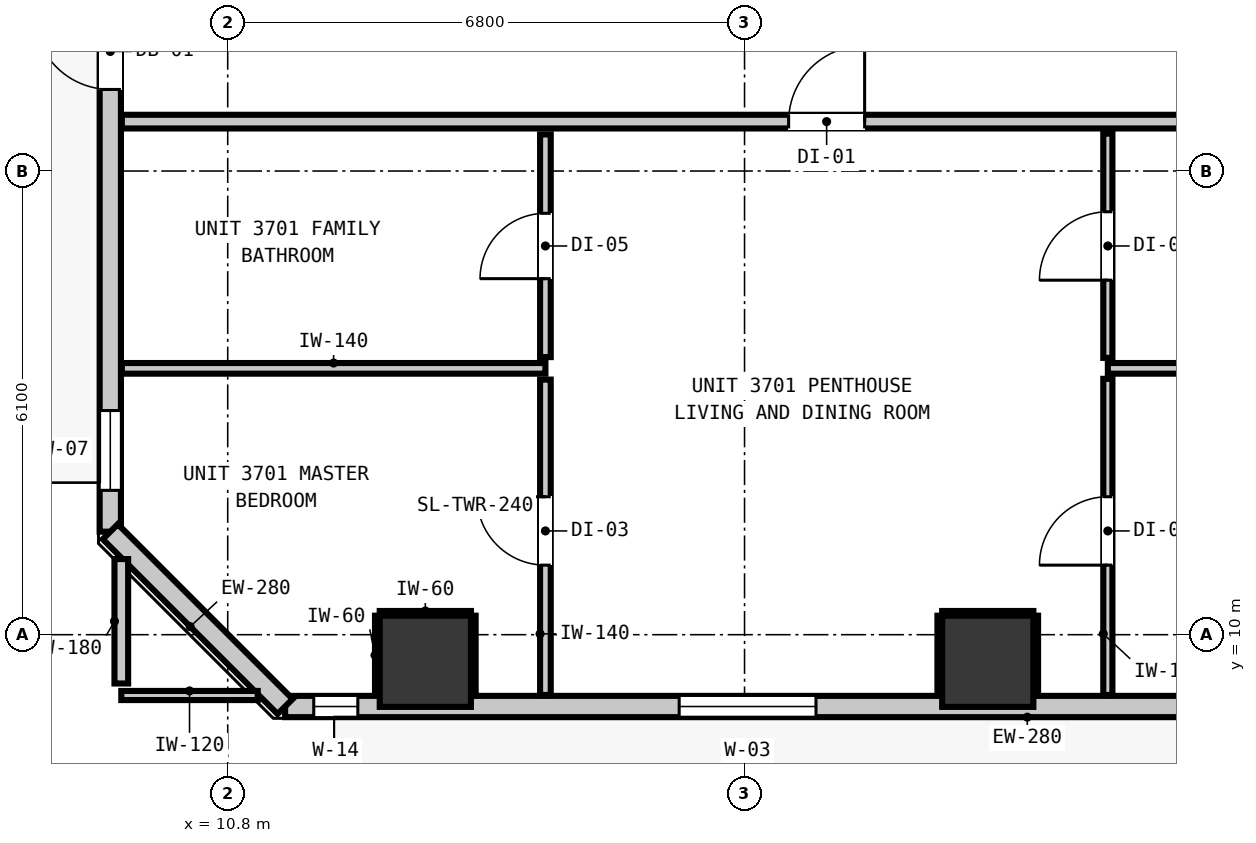
"""IFC4 building model, lengths in metres.
Left out: names, types, materials, properties, quantities, classifications, styles, units other than length and angle.
Written with IfcOpenShell. Run it as: python <this file> out.ifc"""

import sys

from ifc_helpers import new_model, si_unit, direction, frame, frame_2d, origin, origin_2d, place, context, subcontext, project, spatial, rectangle, extrude, element, fill, save


model = new_model("IFC4")
c1 = context("Model", 3, precision=1e-05, world=origin(), true_north=direction((0.0, 1.0)))
c2 = subcontext(c1, "Body", "Model", "MODEL_VIEW")
j1 = project(units=[si_unit("LENGTHUNIT", "METRE"), si_unit("PLANEANGLEUNIT", "RADIAN")], contexts=[c1])
p1 = place(None, origin())
s1 = spatial("IfcSite", under=j1, at=p1, CompositionType="ELEMENT")
p2 = place(p1, origin())
s2 = spatial("IfcBuilding", under=s1, at=p2, CompositionType="ELEMENT")
p3 = place(p2, frame((0.0, 0.0, 129.32)))
s3 = spatial("IfcBuildingStorey", under=s2, at=p3, CompositionType="ELEMENT", Elevation=129.32)
for number, where, z_axis, x_axis in (
    (1, (13.4, 9.65, 0.0), (0.0, 0.0, 1.0), (1.0, 0.0, 0.0)),
    (2, (20.8, 9.65, 0.0), (0.0, 0.0, 1.0), (1.0, 0.0, 0.0)),
):
    element("IfcColumn", number, at=place(p3, frame(where, z_axis=z_axis, x_axis=x_axis)), inside=s3, PredefinedType="COLUMN", context=c2, shape_type="SweptSolid", body=[
        extrude(rectangle(XDim=1.2, YDim=1.2, at=origin_2d()), origin(), (0.0, 0.0, 1.0), 3.32),
    ])
p4 = place(p3, frame((9.255, 11.355, 0.0), z_axis=(0.0, 0.0, 1.0), x_axis=(0.0, 1.0, 0.0)))
e3 = element("IfcWall", 3, at=p4, inside=s3, PredefinedType="STANDARD", context=c2, shape_type="SweptSolid", body=[
    extrude(rectangle(XDim=32.29, YDim=0.28, at=frame_2d((16.145, 0.0))), origin(), (0.0, 0.0, 1.0), 3.08),
])
p5 = place(p4, frame((5.818, 0.0, 0.0)))
e4 = element("IfcOpeningElement", 4, at=p5, cuts=e3, PredefinedType="OPENING", context=c2, shape_type="SweptSolid", body=[
    extrude(rectangle(XDim=1.0, YDim=2.15, at=frame_2d((0.5, 1.075))), frame((0.0, 0.15, 0.0), z_axis=(0.0, -1.0, 0.0), x_axis=(1.0, 0.0, 0.0)), (0.0, 0.0, 1.0), 0.3),
])
p6 = place(p4, frame((0.544, 0.0, 0.85)))
e5 = element("IfcOpeningElement", 5, at=p6, cuts=e3, PredefinedType="OPENING", context=c2, shape_type="SweptSolid", body=[
    extrude(rectangle(XDim=1.05, YDim=1.65, at=frame_2d((0.525, 0.825))), frame((0.0, 0.15, 0.0), z_axis=(0.0, -1.0, 0.0), x_axis=(1.0, 0.0, 0.0)), (0.0, 0.0, 1.0), 0.3),
])
p7 = place(p3, frame((46.645, 9.055, 0.0), z_axis=(0.0, 0.0, 1.0), x_axis=(-1.0, 0.0, 0.0)))
e6 = element("IfcWall", 6, at=p7, inside=s3, PredefinedType="STANDARD", context=c2, shape_type="SweptSolid", body=[
    extrude(rectangle(XDim=35.09, YDim=0.28, at=frame_2d((17.545, 0.0))), origin(), (0.0, 0.0, 1.0), 3.08),
])
p8 = place(p7, frame((0.904, 0.0, 0.0)))
e7 = element("IfcOpeningElement", 7, at=p8, cuts=e6, PredefinedType="OPENING", context=c2, shape_type="SweptSolid", body=[
    extrude(rectangle(XDim=1.0, YDim=2.15, at=frame_2d((0.5, 1.075))), frame((0.0, 0.15, 0.0), z_axis=(0.0, -1.0, 0.0), x_axis=(1.0, 0.0, 0.0)), (0.0, 0.0, 1.0), 0.3),
])
p9 = place(p7, frame((28.105, 0.0, 0.85)))
e8 = element("IfcOpeningElement", 8, at=p9, cuts=e6, PredefinedType="OPENING", context=c2, shape_type="SweptSolid", body=[
    extrude(rectangle(XDim=1.8, YDim=1.9, at=frame_2d((0.9, 0.95))), frame((0.0, 0.15, 0.0), z_axis=(0.0, -1.0, 0.0), x_axis=(1.0, 0.0, 0.0)), (0.0, 0.0, 1.0), 0.3),
])
p10 = place(p7, frame((34.133, 0.0, 0.85)))
e9 = element("IfcOpeningElement", 9, at=p10, cuts=e6, PredefinedType="OPENING", context=c2, shape_type="SweptSolid", body=[
    extrude(rectangle(XDim=0.58, YDim=1.5, at=frame_2d((0.29, 0.75))), frame((0.0, 0.15, 0.0), z_axis=(0.0, -1.0, 0.0), x_axis=(1.0, 0.0, 0.0)), (0.0, 0.0, 1.0), 0.3),
])
p11 = place(p7, frame((20.745, 0.0, 0.85)))
e10 = element("IfcOpeningElement", 10, at=p11, cuts=e6, PredefinedType="OPENING", context=c2, shape_type="SweptSolid", body=[
    extrude(rectangle(XDim=1.8, YDim=1.9, at=frame_2d((0.9, 0.95))), frame((0.0, 0.15, 0.0), z_axis=(0.0, -1.0, 0.0), x_axis=(1.0, 0.0, 0.0)), (0.0, 0.0, 1.0), 0.3),
])
p12 = place(p7, frame((14.873, 0.0, 0.85)))
e11 = element("IfcOpeningElement", 11, at=p12, cuts=e6, PredefinedType="OPENING", context=c2, shape_type="SweptSolid", body=[
    extrude(rectangle(XDim=1.8, YDim=1.9, at=frame_2d((0.9, 0.95))), frame((0.0, 0.15, 0.0), z_axis=(0.0, -1.0, 0.0), x_axis=(1.0, 0.0, 0.0)), (0.0, 0.0, 1.0), 0.3),
])
p13 = place(p7, frame((4.902, 0.0, 0.85)))
e12 = element("IfcOpeningElement", 12, at=p13, cuts=e6, PredefinedType="OPENING", context=c2, shape_type="SweptSolid", body=[
    extrude(rectangle(XDim=1.8, YDim=1.9, at=frame_2d((0.9, 0.95))), frame((0.0, 0.15, 0.0), z_axis=(0.0, -1.0, 0.0), x_axis=(1.0, 0.0, 0.0)), (0.0, 0.0, 1.0), 0.3),
])
p14 = place(p7, frame((11.723, 0.0, 0.85)))
e13 = element("IfcOpeningElement", 13, at=p14, cuts=e6, PredefinedType="OPENING", context=c2, shape_type="SweptSolid", body=[
    extrude(rectangle(XDim=1.8, YDim=1.9, at=frame_2d((0.9, 0.95))), frame((0.0, 0.15, 0.0), z_axis=(0.0, -1.0, 0.0), x_axis=(1.0, 0.0, 0.0)), (0.0, 0.0, 1.0), 0.3),
])
p15 = place(p3, frame((11.555, 9.055, 0.0), z_axis=(0.0, 0.0, 1.0), x_axis=(-0.707106781187, 0.707106781187, 0.0)))
e14 = element("IfcWall", 14, at=p15, inside=s3, PredefinedType="STANDARD", context=c2, shape_type="SweptSolid", body=[
    extrude(rectangle(XDim=3.253, YDim=0.28, at=frame_2d((1.626, 0.0))), origin(), (0.0, 0.0, 1.0), 3.08),
])
p16 = place(p3, frame((9.407, 16.75, 0.0), z_axis=(0.0, 0.0, 1.0), x_axis=(1.0, 0.0, 0.0)))
e15 = element("IfcWall", 15, at=p16, inside=s3, PredefinedType="PARTITIONING", context=c2, shape_type="SweptSolid", body=[
    extrude(rectangle(XDim=39.386, YDim=0.18, at=frame_2d((19.693, 0.0))), origin(), (0.0, 0.0, 1.0), 3.08),
])
p17 = place(p16, frame((8.773, 0.0, 0.0)))
e16 = element("IfcOpeningElement", 16, at=p17, cuts=e15, PredefinedType="OPENING", context=c2, shape_type="SweptSolid", body=[
    extrude(rectangle(XDim=1.0, YDim=2.15, at=frame_2d((0.5, 1.075))), frame((0.0, 0.1, 0.0), z_axis=(0.0, -1.0, 0.0), x_axis=(1.0, 0.0, 0.0)), (0.0, 0.0, 1.0), 0.2),
])
p18 = place(p16, frame((30.936, 0.0, 0.0)))
e17 = element("IfcOpeningElement", 17, at=p18, cuts=e15, PredefinedType="OPENING", context=c2, shape_type="SweptSolid", body=[
    extrude(rectangle(XDim=1.0, YDim=2.15, at=frame_2d((0.5, 1.075))), frame((0.0, 0.1, 0.0), z_axis=(0.0, -1.0, 0.0), x_axis=(1.0, 0.0, 0.0)), (0.0, 0.0, 1.0), 0.2),
])
p19 = place(p3, frame((9.407, 13.504, 0.0), z_axis=(0.0, 0.0, 1.0), x_axis=(1.0, 0.0, 0.0)))
e18 = element("IfcWall", 18, at=p19, inside=s3, PredefinedType="PARTITIONING", context=c2, shape_type="SweptSolid", body=[
    extrude(rectangle(XDim=5.573, YDim=0.14, at=frame_2d((2.787, 0.0))), origin(), (0.0, 0.0, 1.0), 3.08),
])
p20 = place(p3, frame((22.38, 13.504, 0.0), z_axis=(0.0, 0.0, 1.0), x_axis=(1.0, 0.0, 0.0)))
e19 = element("IfcWall", 19, at=p20, inside=s3, PredefinedType="PARTITIONING", context=c2, shape_type="SweptSolid", body=[
    extrude(rectangle(XDim=15.7, YDim=0.14, at=frame_2d((7.85, 0.0))), origin(), (0.0, 0.0, 1.0), 3.08),
])
p21 = place(p3, frame((9.4, 9.2, 0.0), z_axis=(0.0, 0.0, 1.0), x_axis=(1.0, 0.0, 0.0)))
e20 = element("IfcWall", 20, at=p21, inside=s3, PredefinedType="PARTITIONING", context=c2, shape_type="SweptSolid", body=[
    extrude(rectangle(XDim=1.795, YDim=0.12, at=frame_2d((0.897, 0.0))), origin(), (0.0, 0.0, 1.0), 3.08),
])
p22 = place(p3, frame((9.4, 9.358, 0.0), z_axis=(0.0, 0.0, 1.0), x_axis=(0.0, 1.0, 0.0)))
e21 = element("IfcWall", 21, at=p22, inside=s3, PredefinedType="PARTITIONING", context=c2, shape_type="SweptSolid", body=[
    extrude(rectangle(XDim=1.637, YDim=0.18, at=frame_2d((0.819, 0.0))), origin(), (0.0, 0.0, 1.0), 3.08),
])
p23 = place(p3, frame((14.98, 9.207, 0.0), z_axis=(0.0, 0.0, 1.0), x_axis=(0.0, 1.0, 0.0)))
e22 = element("IfcWall", 22, at=p23, inside=s3, PredefinedType="PARTITIONING", context=c2, shape_type="SweptSolid", body=[
    extrude(rectangle(XDim=4.149, YDim=0.14, at=frame_2d((2.074, 0.0))), origin(), (0.0, 0.0, 1.0), 3.08),
])
p24 = place(p23, frame((1.708, 0.0, 0.0)))
e23 = element("IfcOpeningElement", 23, at=p24, cuts=e22, PredefinedType="OPENING", context=c2, shape_type="SweptSolid", body=[
    extrude(rectangle(XDim=0.9, YDim=2.1, at=frame_2d((0.45, 1.05))), frame((0.0, 0.08, 0.0), z_axis=(0.0, -1.0, 0.0), x_axis=(1.0, 0.0, 0.0)), (0.0, 0.0, 1.0), 0.16),
])
p25 = place(p3, frame((14.98, 13.652, 0.0), z_axis=(0.0, 0.0, 1.0), x_axis=(0.0, 1.0, 0.0)))
e24 = element("IfcWall", 24, at=p25, inside=s3, PredefinedType="PARTITIONING", context=c2, shape_type="SweptSolid", body=[
    extrude(rectangle(XDim=2.93, YDim=0.14, at=frame_2d((1.465, 0.0))), origin(), (0.0, 0.0, 1.0), 3.08),
])
p26 = place(p25, frame((1.032, 0.0, 0.0)))
e25 = element("IfcOpeningElement", 25, at=p26, cuts=e24, PredefinedType="OPENING", context=c2, shape_type="SweptSolid", body=[
    extrude(rectangle(XDim=0.86, YDim=2.02, at=frame_2d((0.43, 1.01))), frame((0.0, 0.08, 0.0), z_axis=(0.0, -1.0, 0.0), x_axis=(1.0, 0.0, 0.0)), (0.0, 0.0, 1.0), 0.16),
])
p27 = place(p3, frame((22.38, 9.207, 0.0), z_axis=(0.0, 0.0, 1.0), x_axis=(0.0, 1.0, 0.0)))
e26 = element("IfcWall", 26, at=p27, inside=s3, PredefinedType="PARTITIONING", context=c2, shape_type="SweptSolid", body=[
    extrude(rectangle(XDim=4.159, YDim=0.12, at=frame_2d((2.08, 0.0))), origin(), (0.0, 0.0, 1.0), 3.08),
])
p28 = place(p27, frame((1.708, 0.0, 0.0)))
e27 = element("IfcOpeningElement", 27, at=p28, cuts=e26, PredefinedType="OPENING", context=c2, shape_type="SweptSolid", body=[
    extrude(rectangle(XDim=0.9, YDim=2.1, at=frame_2d((0.45, 1.05))), frame((0.0, 0.07, 0.0), z_axis=(0.0, -1.0, 0.0), x_axis=(1.0, 0.0, 0.0)), (0.0, 0.0, 1.0), 0.14),
])
p29 = place(p3, frame((22.38, 13.642, 0.0), z_axis=(0.0, 0.0, 1.0), x_axis=(0.0, 1.0, 0.0)))
e28 = element("IfcWall", 28, at=p29, inside=s3, PredefinedType="PARTITIONING", context=c2, shape_type="SweptSolid", body=[
    extrude(rectangle(XDim=2.95, YDim=0.12, at=frame_2d((1.475, 0.0))), origin(), (0.0, 0.0, 1.0), 3.08),
])
p30 = place(p29, frame((1.022, 0.0, 0.0)))
e29 = element("IfcOpeningElement", 29, at=p30, cuts=e28, PredefinedType="OPENING", context=c2, shape_type="SweptSolid", body=[
    extrude(rectangle(XDim=0.9, YDim=2.1, at=frame_2d((0.45, 1.05))), frame((0.0, 0.07, 0.0), z_axis=(0.0, -1.0, 0.0), x_axis=(1.0, 0.0, 0.0)), (0.0, 0.0, 1.0), 0.14),
])
p31 = place(p3, frame((12.8, 10.282, 0.0), z_axis=(0.0, 0.0, 1.0), x_axis=(1.0, 0.0, 0.0)))
e30 = element("IfcWall", 30, at=p31, inside=s3, PredefinedType="PARTITIONING", context=c2, shape_type="SweptSolid", body=[
    extrude(rectangle(XDim=1.2, YDim=0.06, at=frame_2d((0.6, 0.0))), origin(), (0.0, 0.0, 1.0), 1.45),
])
for number, where, z_axis, x_axis in (
    (31, (12.768, 9.21, 0.0), (0.0, 0.0, 1.0), (0.0, 1.0, 0.0)),
    (32, (14.032, 9.21, 0.0), (0.0, 0.0, 1.0), (0.0, 1.0, 0.0)),
):
    element("IfcWall", number, at=place(p3, frame(where, z_axis=z_axis, x_axis=x_axis)), inside=s3, PredefinedType="PARTITIONING", context=c2, shape_type="SweptSolid", body=[
        extrude(rectangle(XDim=1.04, YDim=0.06, at=frame_2d((0.52, 0.0))), origin(), (0.0, 0.0, 1.0), 1.45),
    ])
p32 = place(p3, frame((20.2, 10.282, 0.0), z_axis=(0.0, 0.0, 1.0), x_axis=(1.0, 0.0, 0.0)))
e33 = element("IfcWall", 33, at=p32, inside=s3, PredefinedType="PARTITIONING", context=c2, shape_type="SweptSolid", body=[
    extrude(rectangle(XDim=1.2, YDim=0.06, at=frame_2d((0.6, 0.0))), origin(), (0.0, 0.0, 1.0), 1.45),
])
for number, where, z_axis, x_axis in (
    (34, (20.168, 9.21, 0.0), (0.0, 0.0, 1.0), (0.0, 1.0, 0.0)),
    (35, (21.432, 9.21, 0.0), (0.0, 0.0, 1.0), (0.0, 1.0, 0.0)),
):
    element("IfcWall", number, at=place(p3, frame(where, z_axis=z_axis, x_axis=x_axis)), inside=s3, PredefinedType="PARTITIONING", context=c2, shape_type="SweptSolid", body=[
        extrude(rectangle(XDim=1.04, YDim=0.06, at=frame_2d((0.52, 0.0))), origin(), (0.0, 0.0, 1.0), 1.45),
    ])
p33 = place(p5, origin())
e36 = element("IfcDoor", 36, at=p33, inside=s3, OperationType="SINGLE_SWING_RIGHT", PredefinedType="DOOR", context=c2, shape_type="SweptSolid", body=[
    extrude(rectangle(XDim=1.0, YDim=2.15, at=frame_2d((0.5, 1.075))), frame((0.0, 0.025, 0.0), z_axis=(0.0, -1.0, 0.0), x_axis=(1.0, 0.0, 0.0)), (0.0, 0.0, 1.0), 0.05),
])
fill(e4, e36)
p34 = place(p6, origin())
e37 = element("IfcWindow", 37, at=p34, inside=s3, PartitioningType="SINGLE_PANEL", PredefinedType="WINDOW", context=c2, shape_type="SweptSolid", body=[
    extrude(rectangle(XDim=1.05, YDim=1.65, at=frame_2d((0.525, 0.825))), frame((0.0, 0.03, 0.0), z_axis=(0.0, -1.0, 0.0), x_axis=(1.0, 0.0, 0.0)), (0.0, 0.0, 1.0), 0.06),
])
fill(e5, e37)
p35 = place(p9, origin())
e38 = element("IfcWindow", 38, at=p35, inside=s3, PartitioningType="SINGLE_PANEL", PredefinedType="WINDOW", context=c2, shape_type="SweptSolid", body=[
    extrude(rectangle(XDim=1.8, YDim=1.9, at=frame_2d((0.9, 0.95))), frame((0.0, 0.03, 0.0), z_axis=(0.0, -1.0, 0.0), x_axis=(1.0, 0.0, 0.0)), (0.0, 0.0, 1.0), 0.06),
])
fill(e8, e38)
p36 = place(p10, origin())
e39 = element("IfcWindow", 39, at=p36, inside=s3, PartitioningType="SINGLE_PANEL", PredefinedType="WINDOW", context=c2, shape_type="SweptSolid", body=[
    extrude(rectangle(XDim=0.58, YDim=1.5, at=frame_2d((0.29, 0.75))), frame((0.0, 0.03, 0.0), z_axis=(0.0, -1.0, 0.0), x_axis=(1.0, 0.0, 0.0)), (0.0, 0.0, 1.0), 0.06),
])
fill(e9, e39)
p37 = place(p17, origin())
e40 = element("IfcDoor", 40, at=p37, inside=s3, OperationType="SINGLE_SWING_RIGHT", PredefinedType="DOOR", context=c2, shape_type="SweptSolid", body=[
    extrude(rectangle(XDim=1.0, YDim=2.15, at=frame_2d((0.5, 1.075))), frame((0.0, 0.025, 0.0), z_axis=(0.0, -1.0, 0.0), x_axis=(1.0, 0.0, 0.0)), (0.0, 0.0, 1.0), 0.05),
])
fill(e16, e40)
p38 = place(p26, origin())
e41 = element("IfcDoor", 41, at=p38, inside=s3, OperationType="SINGLE_SWING_LEFT", PredefinedType="DOOR", context=c2, shape_type="SweptSolid", body=[
    extrude(rectangle(XDim=0.86, YDim=2.02, at=frame_2d((0.43, 1.01))), frame((0.0, 0.025, 0.0), z_axis=(0.0, -1.0, 0.0), x_axis=(1.0, 0.0, 0.0)), (0.0, 0.0, 1.0), 0.05),
])
fill(e25, e41)
p39 = place(p24, origin())
e42 = element("IfcDoor", 42, at=p39, inside=s3, OperationType="SINGLE_SWING_RIGHT", PredefinedType="DOOR", context=c2, shape_type="SweptSolid", body=[
    extrude(rectangle(XDim=0.9, YDim=2.1, at=frame_2d((0.45, 1.05))), frame((0.0, 0.025, 0.0), z_axis=(0.0, -1.0, 0.0), x_axis=(1.0, 0.0, 0.0)), (0.0, 0.0, 1.0), 0.05),
])
fill(e23, e42)
p40 = place(p30, origin())
e43 = element("IfcDoor", 43, at=p40, inside=s3, OperationType="SINGLE_SWING_LEFT", PredefinedType="DOOR", context=c2, shape_type="SweptSolid", body=[
    extrude(rectangle(XDim=0.9, YDim=2.1, at=frame_2d((0.45, 1.05))), frame((0.0, 0.025, 0.0), z_axis=(0.0, -1.0, 0.0), x_axis=(1.0, 0.0, 0.0)), (0.0, 0.0, 1.0), 0.05),
])
fill(e29, e43)
p41 = place(p28, origin())
e44 = element("IfcDoor", 44, at=p41, inside=s3, OperationType="SINGLE_SWING_LEFT", PredefinedType="DOOR", context=c2, shape_type="SweptSolid", body=[
    extrude(rectangle(XDim=0.9, YDim=2.1, at=frame_2d((0.45, 1.05))), frame((0.0, 0.025, 0.0), z_axis=(0.0, -1.0, 0.0), x_axis=(1.0, 0.0, 0.0)), (0.0, 0.0, 1.0), 0.05),
])
fill(e27, e44)
save(model, sys.argv[1])
